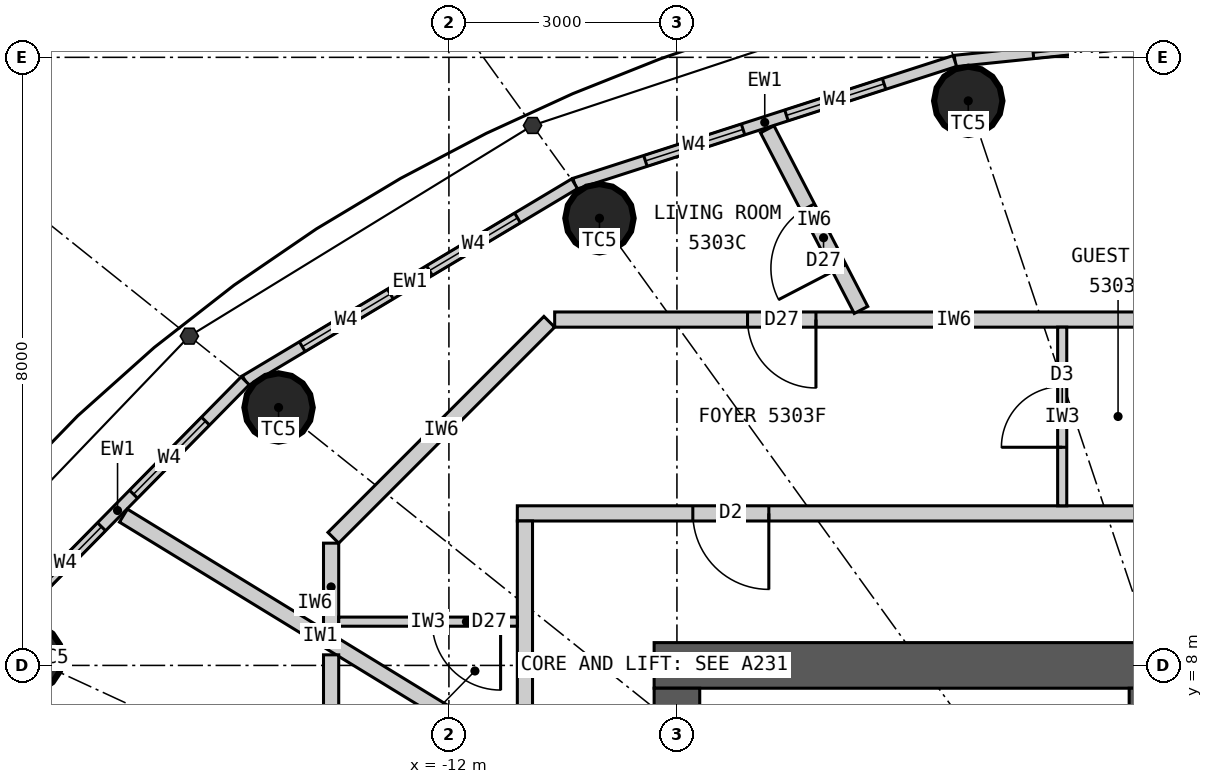
"""IFC4 building model, lengths in metres.
Left out: names, types, materials, properties, quantities, classifications, styles, units other than length and angle.
Written with IfcOpenShell. Run it as: python <this file> out.ifc"""

import sys

from ifc_helpers import new_model, si_unit, direction, frame, frame_2d, origin, origin_2d, place, context, subcontext, project, spatial, rectangle, circle, extrude, element, fill, save


model = new_model("IFC4")
c1 = context("Model", 3, precision=1e-05, world=origin(), true_north=direction((0.0, 1.0)))
c2 = subcontext(c1, "Body", "Model", "MODEL_VIEW")
j1 = project(units=[si_unit("LENGTHUNIT", "METRE"), si_unit("PLANEANGLEUNIT", "RADIAN")], contexts=[c1])
p1 = place(None, origin())
s1 = spatial("IfcSite", under=j1, at=p1, CompositionType="ELEMENT")
p2 = place(p1, origin())
s2 = spatial("IfcBuilding", under=s1, at=p2, CompositionType="ELEMENT")
p3 = place(p2, frame((0.0, 0.0, 199.5)))
s3 = spatial("IfcBuildingStorey", under=s2, at=p3, CompositionType="ELEMENT", Elevation=199.5)
for number, where, z_axis, x_axis in (
    (1, (-5.167, 15.427, 0.0), (0.0, 0.0, 1.0), (1.0, 0.0, 0.0)),
    (2, (-10.019, 13.883, 0.0), (0.0, 0.0, 1.0), (1.0, 0.0, 0.0)),
    (3, (-14.241, 11.393, 0.0), (0.0, 0.0, 1.0), (1.0, 0.0, 0.0)),
    (4, (-17.532, 8.098, 0.0), (0.0, 0.0, 1.0), (1.0, 0.0, 0.0)),
):
    element("IfcColumn", number, at=place(p3, frame(where, z_axis=z_axis, x_axis=x_axis)), inside=s3, PredefinedType="COLUMN", context=c2, shape_type="SweptSolid", body=[
        extrude(circle(Radius=0.45, at=origin_2d()), origin(), (0.0, 0.0, 1.0), 3.3),
    ])
p4 = place(p3, frame((-9.3, 8.0, 0.0), z_axis=(0.0, 0.0, 1.0), x_axis=(1.0, 0.0, 0.0)))
e5 = element("IfcWall", 5, at=p4, inside=s3, PredefinedType="SHEAR", context=c2, shape_type="SweptSolid", body=[
    extrude(rectangle(XDim=18.6, YDim=0.6, at=frame_2d((9.3, 0.0))), origin(), (0.0, 0.0, 1.0), 3.3),
])
p5 = place(p4, frame((8.0, 0.0, 0.0)))
e6 = element("IfcOpeningElement", 6, at=p5, cuts=e5, PredefinedType="OPENING", context=c2, shape_type="SweptSolid", body=[
    extrude(rectangle(XDim=1.2, YDim=2.2, at=frame_2d((0.6, 1.1))), frame((0.0, 0.31, 0.0), z_axis=(0.0, -1.0, 0.0), x_axis=(1.0, 0.0, 0.0)), (0.0, 0.0, 1.0), 0.62),
])
p6 = place(p4, frame((15.6, 0.0, 0.0)))
e7 = element("IfcOpeningElement", 7, at=p6, cuts=e5, PredefinedType="OPENING", context=c2, shape_type="SweptSolid", body=[
    extrude(rectangle(XDim=0.9, YDim=2.2, at=frame_2d((0.45, 1.1))), frame((0.0, 0.31, 0.0), z_axis=(0.0, -1.0, 0.0), x_axis=(1.0, 0.0, 0.0)), (0.0, 0.0, 1.0), 0.62),
])
p7 = place(p3, frame((-9.0, 7.7, 0.0), z_axis=(0.0, 0.0, 1.0), x_axis=(0.0, -1.0, 0.0)))
e8 = element("IfcWall", 8, at=p7, inside=s3, PredefinedType="SHEAR", context=c2, shape_type="SweptSolid", body=[
    extrude(rectangle(XDim=15.4, YDim=0.6, at=frame_2d((7.7, 0.0))), origin(), (0.0, 0.0, 1.0), 3.3),
])
p8 = place(p7, frame((6.8, 0.0, 0.0)))
e9 = element("IfcOpeningElement", 9, at=p8, cuts=e8, PredefinedType="OPENING", context=c2, shape_type="SweptSolid", body=[
    extrude(rectangle(XDim=1.8, YDim=2.2, at=frame_2d((0.9, 1.1))), frame((0.0, 0.31, 0.0), z_axis=(0.0, -1.0, 0.0), x_axis=(1.0, 0.0, 0.0)), (0.0, 0.0, 1.0), 0.62),
])
p9 = place(p3, frame((-2.75, 4.5, 0.0), z_axis=(0.0, 0.0, 1.0), x_axis=(0.0, 1.0, 0.0)))
e10 = element("IfcWall", 10, at=p9, inside=s3, PredefinedType="SHEAR", context=c2, shape_type="SweptSolid", body=[
    extrude(rectangle(XDim=3.2, YDim=0.6, at=frame_2d((1.6, 0.0))), origin(), (0.0, 0.0, 1.0), 3.3),
])
p10 = place(p9, frame((0.925, 0.0, 0.0)))
e11 = element("IfcOpeningElement", 11, at=p10, cuts=e10, PredefinedType="OPENING", context=c2, shape_type="SweptSolid", body=[
    extrude(rectangle(XDim=1.1, YDim=2.2, at=frame_2d((0.55, 1.1))), frame((0.0, 0.31, 0.0), z_axis=(0.0, -1.0, 0.0), x_axis=(1.0, 0.0, 0.0)), (0.0, 0.0, 1.0), 0.62),
])
p11 = place(p3, frame((0.0, 16.5, 0.0), z_axis=(0.0, 0.0, 1.0), x_axis=(-0.994774574972, -0.102095763818, 0.0)))
e12 = element("IfcWall", 12, at=p11, inside=s3, PredefinedType="ELEMENTEDWALL", context=c2, shape_type="SweptSolid", body=[
    extrude(rectangle(XDim=5.371, YDim=0.15, at=frame_2d((2.686, 0.0))), origin(), (0.0, 0.0, 1.0), 3.12),
])
p12 = place(p11, frame((1.035, 0.0, 0.9)))
e13 = element("IfcOpeningElement", 13, at=p12, cuts=e12, PredefinedType="OPENING", context=c2, shape_type="SweptSolid", body=[
    extrude(rectangle(XDim=1.35, YDim=1.9, at=frame_2d((0.675, 0.95))), frame((0.0, 0.085, 0.0), z_axis=(0.0, -1.0, 0.0), x_axis=(1.0, 0.0, 0.0)), (0.0, 0.0, 1.0), 0.17),
])
p13 = place(p11, frame((2.985, 0.0, 0.9)))
e14 = element("IfcOpeningElement", 14, at=p13, cuts=e12, PredefinedType="OPENING", context=c2, shape_type="SweptSolid", body=[
    extrude(rectangle(XDim=1.35, YDim=1.9, at=frame_2d((0.675, 0.95))), frame((0.0, 0.085, 0.0), z_axis=(0.0, -1.0, 0.0), x_axis=(1.0, 0.0, 0.0)), (0.0, 0.0, 1.0), 0.17),
])
p14 = place(p3, frame((-5.343, 15.952, 0.0), z_axis=(0.0, 0.0, 1.0), x_axis=(-0.951644702515, -0.307200846638, 0.0)))
e15 = element("IfcWall", 15, at=p14, inside=s3, PredefinedType="ELEMENTEDWALL", context=c2, shape_type="SweptSolid", body=[
    extrude(rectangle(XDim=5.258, YDim=0.15, at=frame_2d((2.629, 0.0))), origin(), (0.0, 0.0, 1.0), 3.12),
])
p15 = place(p14, frame((0.979, 0.0, 0.9)))
e16 = element("IfcOpeningElement", 16, at=p15, cuts=e15, PredefinedType="OPENING", context=c2, shape_type="SweptSolid", body=[
    extrude(rectangle(XDim=1.35, YDim=1.9, at=frame_2d((0.675, 0.95))), frame((0.0, 0.085, 0.0), z_axis=(0.0, -1.0, 0.0), x_axis=(1.0, 0.0, 0.0)), (0.0, 0.0, 1.0), 0.17),
])
p16 = place(p14, frame((2.929, 0.0, 0.9)))
e17 = element("IfcOpeningElement", 17, at=p16, cuts=e15, PredefinedType="OPENING", context=c2, shape_type="SweptSolid", body=[
    extrude(rectangle(XDim=1.35, YDim=1.9, at=frame_2d((0.675, 0.95))), frame((0.0, 0.085, 0.0), z_axis=(0.0, -1.0, 0.0), x_axis=(1.0, 0.0, 0.0)), (0.0, 0.0, 1.0), 0.17),
])
p17 = place(p3, frame((-10.346, 14.336, 0.0), z_axis=(0.0, 0.0, 1.0), x_axis=(-0.85822150553, -0.513279502265, 0.0)))
e18 = element("IfcWall", 18, at=p17, inside=s3, PredefinedType="ELEMENTEDWALL", context=c2, shape_type="SweptSolid", body=[
    extrude(rectangle(XDim=5.05, YDim=0.15, at=frame_2d((2.525, 0.0))), origin(), (0.0, 0.0, 1.0), 3.12),
])
p18 = place(p17, frame((0.875, 0.0, 0.9)))
e19 = element("IfcOpeningElement", 19, at=p18, cuts=e18, PredefinedType="OPENING", context=c2, shape_type="SweptSolid", body=[
    extrude(rectangle(XDim=1.35, YDim=1.9, at=frame_2d((0.675, 0.95))), frame((0.0, 0.085, 0.0), z_axis=(0.0, -1.0, 0.0), x_axis=(1.0, 0.0, 0.0)), (0.0, 0.0, 1.0), 0.17),
])
p19 = place(p17, frame((2.825, 0.0, 0.9)))
e20 = element("IfcOpeningElement", 20, at=p19, cuts=e18, PredefinedType="OPENING", context=c2, shape_type="SweptSolid", body=[
    extrude(rectangle(XDim=1.35, YDim=1.9, at=frame_2d((0.675, 0.95))), frame((0.0, 0.085, 0.0), z_axis=(0.0, -1.0, 0.0), x_axis=(1.0, 0.0, 0.0)), (0.0, 0.0, 1.0), 0.17),
])
p20 = place(p3, frame((-14.68, 11.744, 0.0), z_axis=(0.0, 0.0, 1.0), x_axis=(-0.701527379618, -0.712642501993, 0.0)))
e21 = element("IfcWall", 21, at=p20, inside=s3, PredefinedType="ELEMENTEDWALL", context=c2, shape_type="SweptSolid", body=[
    extrude(rectangle(XDim=4.788, YDim=0.15, at=frame_2d((2.394, 0.0))), origin(), (0.0, 0.0, 1.0), 3.12),
])
p21 = place(p20, frame((0.744, 0.0, 0.9)))
e22 = element("IfcOpeningElement", 22, at=p21, cuts=e21, PredefinedType="OPENING", context=c2, shape_type="SweptSolid", body=[
    extrude(rectangle(XDim=1.35, YDim=1.9, at=frame_2d((0.675, 0.95))), frame((0.0, 0.085, 0.0), z_axis=(0.0, -1.0, 0.0), x_axis=(1.0, 0.0, 0.0)), (0.0, 0.0, 1.0), 0.17),
])
p22 = place(p20, frame((2.694, 0.0, 0.9)))
e23 = element("IfcOpeningElement", 23, at=p22, cuts=e21, PredefinedType="OPENING", context=c2, shape_type="SweptSolid", body=[
    extrude(rectangle(XDim=1.35, YDim=1.9, at=frame_2d((0.675, 0.95))), frame((0.0, 0.085, 0.0), z_axis=(0.0, -1.0, 0.0), x_axis=(1.0, 0.0, 0.0)), (0.0, 0.0, 1.0), 0.17),
])
p23 = place(p3, frame((-11.1, 10.0, 0.0), z_axis=(0.0, 0.0, 1.0), x_axis=(1.0, 0.0, 0.0)))
e24 = element("IfcWall", 24, at=p23, inside=s3, PredefinedType="PARTITIONING", context=c2, shape_type="SweptSolid", body=[
    extrude(rectangle(XDim=22.2, YDim=0.2, at=frame_2d((11.1, 0.0))), origin(), (0.0, 0.0, 1.0), 3.12),
])
p24 = place(p23, frame((2.309, 0.0, 0.0)))
e25 = element("IfcOpeningElement", 25, at=p24, cuts=e24, PredefinedType="OPENING", context=c2, shape_type="SweptSolid", body=[
    extrude(rectangle(XDim=1.0, YDim=2.2, at=frame_2d((0.5, 1.1))), frame((0.0, 0.11, 0.0), z_axis=(0.0, -1.0, 0.0), x_axis=(1.0, 0.0, 0.0)), (0.0, 0.0, 1.0), 0.22),
])
p25 = place(p3, frame((-11.0, 9.9, 0.0), z_axis=(0.0, 0.0, 1.0), x_axis=(0.0, -1.0, 0.0)))
e26 = element("IfcWall", 26, at=p25, inside=s3, PredefinedType="PARTITIONING", context=c2, shape_type="SweptSolid", body=[
    extrude(rectangle(XDim=7.416, YDim=0.2, at=frame_2d((3.708, 0.0))), origin(), (0.0, 0.0, 1.0), 3.12),
])
p26 = place(p3, frame((-11.1, 6.797, 0.0), z_axis=(0.0, 0.0, 1.0), x_axis=(-0.852799818179, 0.522237943963, 0.0)))
e27 = element("IfcWall", 27, at=p26, inside=s3, PredefinedType="PARTITIONING", context=c2, shape_type="SweptSolid", body=[
    extrude(rectangle(XDim=6.077, YDim=0.2, at=frame_2d((3.039, 0.0))), origin(), (0.0, 0.0, 1.0), 3.12),
])
p27 = place(p3, frame((-0.101, 12.55, 0.0), z_axis=(0.0, 0.0, 1.0), x_axis=(-1.0, 0.0, 0.0)))
e28 = element("IfcWall", 28, at=p27, inside=s3, PredefinedType="PARTITIONING", context=c2, shape_type="SweptSolid", body=[
    extrude(rectangle(XDim=10.508, YDim=0.2, at=frame_2d((5.254, 0.0))), origin(), (0.0, 0.0, 1.0), 3.12),
])
p28 = place(p27, frame((1.4, 0.0, 0.0)))
e29 = element("IfcOpeningElement", 29, at=p28, cuts=e28, PredefinedType="OPENING", context=c2, shape_type="SweptSolid", body=[
    extrude(rectangle(XDim=0.8, YDim=2.1, at=frame_2d((0.4, 1.05))), frame((0.0, 0.11, 0.0), z_axis=(0.0, -1.0, 0.0), x_axis=(1.0, 0.0, 0.0)), (0.0, 0.0, 1.0), 0.22),
])
p29 = place(p27, frame((7.07, 0.0, 0.0)))
e30 = element("IfcOpeningElement", 30, at=p29, cuts=e28, PredefinedType="OPENING", context=c2, shape_type="SweptSolid", body=[
    extrude(rectangle(XDim=0.9, YDim=2.1, at=frame_2d((0.45, 1.05))), frame((0.0, 0.11, 0.0), z_axis=(0.0, -1.0, 0.0), x_axis=(1.0, 0.0, 0.0)), (0.0, 0.0, 1.0), 0.22),
])
p30 = place(p3, frame((-10.679, 12.521, 0.0), z_axis=(0.0, 0.0, 1.0), x_axis=(-0.707106781187, -0.707106781187, 0.0)))
e31 = element("IfcWall", 31, at=p30, inside=s3, PredefinedType="PARTITIONING", context=c2, shape_type="SweptSolid", body=[
    extrude(rectangle(XDim=4.019, YDim=0.2, at=frame_2d((2.009, 0.0))), origin(), (0.0, 0.0, 1.0), 3.12),
])
p31 = place(p3, frame((-13.55, 9.609, 0.0), z_axis=(0.0, 0.0, 1.0), x_axis=(0.0, -1.0, 0.0)))
e32 = element("IfcWall", 32, at=p31, inside=s3, PredefinedType="PARTITIONING", context=c2, shape_type="SweptSolid", body=[
    extrude(rectangle(XDim=1.153, YDim=0.2, at=frame_2d((0.576, 0.0))), origin(), (0.0, 0.0, 1.0), 3.12),
])
p32 = place(p3, frame((-6.578, 12.677, 0.0), z_axis=(0.0, 0.0, 1.0), x_axis=(-0.460620531465, 0.887597164255, 0.0)))
e33 = element("IfcWall", 33, at=p32, inside=s3, PredefinedType="PARTITIONING", context=c2, shape_type="SweptSolid", body=[
    extrude(rectangle(XDim=2.678, YDim=0.2, at=frame_2d((1.339, 0.0))), origin(), (0.0, 0.0, 1.0), 3.12),
])
p33 = place(p32, frame((0.62, 0.0, 0.0)))
e34 = element("IfcOpeningElement", 34, at=p33, cuts=e33, PredefinedType="OPENING", context=c2, shape_type="SweptSolid", body=[
    extrude(rectangle(XDim=0.9, YDim=2.1, at=frame_2d((0.45, 1.05))), frame((0.0, 0.11, 0.0), z_axis=(0.0, -1.0, 0.0), x_axis=(1.0, 0.0, 0.0)), (0.0, 0.0, 1.0), 0.22),
])
p34 = place(p3, frame((-3.931, 10.1, 0.0), z_axis=(0.0, 0.0, 1.0), x_axis=(0.0, 1.0, 0.0)))
e35 = element("IfcWall", 35, at=p34, inside=s3, PredefinedType="PARTITIONING", context=c2, shape_type="SweptSolid", body=[
    extrude(rectangle(XDim=2.35, YDim=0.12, at=frame_2d((1.175, 0.0))), origin(), (0.0, 0.0, 1.0), 3.12),
])
p35 = place(p34, frame((0.77, 0.0, 0.0)))
e36 = element("IfcOpeningElement", 36, at=p35, cuts=e35, PredefinedType="OPENING", context=c2, shape_type="SweptSolid", body=[
    extrude(rectangle(XDim=0.8, YDim=2.1, at=frame_2d((0.4, 1.05))), frame((0.0, 0.07, 0.0), z_axis=(0.0, -1.0, 0.0), x_axis=(1.0, 0.0, 0.0)), (0.0, 0.0, 1.0), 0.14),
])
p36 = place(p3, frame((-11.1, 8.576, 0.0), z_axis=(0.0, 0.0, 1.0), x_axis=(-1.0, 0.0, 0.0)))
e37 = element("IfcWall", 37, at=p36, inside=s3, PredefinedType="PARTITIONING", context=c2, shape_type="SweptSolid", body=[
    extrude(rectangle(XDim=2.35, YDim=0.12, at=frame_2d((1.175, 0.0))), origin(), (0.0, 0.0, 1.0), 3.12),
])
p37 = place(p36, frame((0.22, 0.0, 0.0)))
e38 = element("IfcOpeningElement", 38, at=p37, cuts=e37, PredefinedType="OPENING", context=c2, shape_type="SweptSolid", body=[
    extrude(rectangle(XDim=0.9, YDim=2.1, at=frame_2d((0.45, 1.05))), frame((0.0, 0.07, 0.0), z_axis=(0.0, -1.0, 0.0), x_axis=(1.0, 0.0, 0.0)), (0.0, 0.0, 1.0), 0.14),
])
p38 = place(p3, frame((-13.55, 8.139, 0.0), z_axis=(0.0, 0.0, 1.0), x_axis=(0.0, -1.0, 0.0)))
e39 = element("IfcWall", 39, at=p38, inside=s3, PredefinedType="PARTITIONING", context=c2, shape_type="SweptSolid", body=[
    extrude(rectangle(XDim=12.496, YDim=0.2, at=frame_2d((6.248, 0.0))), origin(), (0.0, 0.0, 1.0), 3.12),
])
p39 = place(p38, frame((2.42, 0.0, 0.0)))
e40 = element("IfcOpeningElement", 40, at=p39, cuts=e39, PredefinedType="OPENING", context=c2, shape_type="SweptSolid", body=[
    extrude(rectangle(XDim=0.8, YDim=2.1, at=frame_2d((0.4, 1.05))), frame((0.0, 0.11, 0.0), z_axis=(0.0, -1.0, 0.0), x_axis=(1.0, 0.0, 0.0)), (0.0, 0.0, 1.0), 0.22),
])
p40 = place(p38, frame((9.776, 0.0, 0.0)))
e41 = element("IfcOpeningElement", 41, at=p40, cuts=e39, PredefinedType="OPENING", context=c2, shape_type="SweptSolid", body=[
    extrude(rectangle(XDim=0.8, YDim=2.1, at=frame_2d((0.4, 1.05))), frame((0.0, 0.11, 0.0), z_axis=(0.0, -1.0, 0.0), x_axis=(1.0, 0.0, 0.0)), (0.0, 0.0, 1.0), 0.22),
])
p41 = place(p38, frame((5.82, 0.0, 0.0)))
e42 = element("IfcOpeningElement", 42, at=p41, cuts=e39, PredefinedType="OPENING", context=c2, shape_type="SweptSolid", body=[
    extrude(rectangle(XDim=0.9, YDim=2.1, at=frame_2d((0.45, 1.05))), frame((0.0, 0.11, 0.0), z_axis=(0.0, -1.0, 0.0), x_axis=(1.0, 0.0, 0.0)), (0.0, 0.0, 1.0), 0.22),
])
p42 = place(p13, origin())
e43 = element("IfcWindow", 43, at=p42, inside=s3, PartitioningType="SINGLE_PANEL", PredefinedType="WINDOW", context=c2, shape_type="SweptSolid", body=[
    extrude(rectangle(XDim=1.35, YDim=1.9, at=frame_2d((0.675, 0.95))), frame((0.0, 0.03, 0.0), z_axis=(0.0, -1.0, 0.0), x_axis=(1.0, 0.0, 0.0)), (0.0, 0.0, 1.0), 0.06),
])
fill(e14, e43)
p43 = place(p15, origin())
e44 = element("IfcWindow", 44, at=p43, inside=s3, PartitioningType="SINGLE_PANEL", PredefinedType="WINDOW", context=c2, shape_type="SweptSolid", body=[
    extrude(rectangle(XDim=1.35, YDim=1.9, at=frame_2d((0.675, 0.95))), frame((0.0, 0.03, 0.0), z_axis=(0.0, -1.0, 0.0), x_axis=(1.0, 0.0, 0.0)), (0.0, 0.0, 1.0), 0.06),
])
fill(e16, e44)
p44 = place(p16, origin())
e45 = element("IfcWindow", 45, at=p44, inside=s3, PartitioningType="SINGLE_PANEL", PredefinedType="WINDOW", context=c2, shape_type="SweptSolid", body=[
    extrude(rectangle(XDim=1.35, YDim=1.9, at=frame_2d((0.675, 0.95))), frame((0.0, 0.03, 0.0), z_axis=(0.0, -1.0, 0.0), x_axis=(1.0, 0.0, 0.0)), (0.0, 0.0, 1.0), 0.06),
])
fill(e17, e45)
p45 = place(p18, origin())
e46 = element("IfcWindow", 46, at=p45, inside=s3, PartitioningType="SINGLE_PANEL", PredefinedType="WINDOW", context=c2, shape_type="SweptSolid", body=[
    extrude(rectangle(XDim=1.35, YDim=1.9, at=frame_2d((0.675, 0.95))), frame((0.0, 0.03, 0.0), z_axis=(0.0, -1.0, 0.0), x_axis=(1.0, 0.0, 0.0)), (0.0, 0.0, 1.0), 0.06),
])
fill(e19, e46)
p46 = place(p19, origin())
e47 = element("IfcWindow", 47, at=p46, inside=s3, PartitioningType="SINGLE_PANEL", PredefinedType="WINDOW", context=c2, shape_type="SweptSolid", body=[
    extrude(rectangle(XDim=1.35, YDim=1.9, at=frame_2d((0.675, 0.95))), frame((0.0, 0.03, 0.0), z_axis=(0.0, -1.0, 0.0), x_axis=(1.0, 0.0, 0.0)), (0.0, 0.0, 1.0), 0.06),
])
fill(e20, e47)
p47 = place(p21, origin())
e48 = element("IfcWindow", 48, at=p47, inside=s3, PartitioningType="SINGLE_PANEL", PredefinedType="WINDOW", context=c2, shape_type="SweptSolid", body=[
    extrude(rectangle(XDim=1.35, YDim=1.9, at=frame_2d((0.675, 0.95))), frame((0.0, 0.03, 0.0), z_axis=(0.0, -1.0, 0.0), x_axis=(1.0, 0.0, 0.0)), (0.0, 0.0, 1.0), 0.06),
])
fill(e22, e48)
p48 = place(p22, origin())
e49 = element("IfcWindow", 49, at=p48, inside=s3, PartitioningType="SINGLE_PANEL", PredefinedType="WINDOW", context=c2, shape_type="SweptSolid", body=[
    extrude(rectangle(XDim=1.35, YDim=1.9, at=frame_2d((0.675, 0.95))), frame((0.0, 0.03, 0.0), z_axis=(0.0, -1.0, 0.0), x_axis=(1.0, 0.0, 0.0)), (0.0, 0.0, 1.0), 0.06),
])
fill(e23, e49)
p49 = place(p24, origin())
e50 = element("IfcDoor", 50, at=p49, inside=s3, OperationType="SINGLE_SWING_RIGHT", PredefinedType="DOOR", context=c2, shape_type="SweptSolid", body=[
    extrude(rectangle(XDim=1.0, YDim=2.2, at=frame_2d((0.5, 1.1))), frame((0.0, 0.025, 0.0), z_axis=(0.0, -1.0, 0.0), x_axis=(1.0, 0.0, 0.0)), (0.0, 0.0, 1.0), 0.05),
])
fill(e25, e50)
p50 = place(p35, origin())
e51 = element("IfcDoor", 51, at=p50, inside=s3, OperationType="SINGLE_SWING_LEFT", PredefinedType="DOOR", context=c2, shape_type="SweptSolid", body=[
    extrude(rectangle(XDim=0.8, YDim=2.1, at=frame_2d((0.4, 1.05))), frame((0.0, 0.025, 0.0), z_axis=(0.0, -1.0, 0.0), x_axis=(1.0, 0.0, 0.0)), (0.0, 0.0, 1.0), 0.05),
])
fill(e36, e51)
p51 = place(p37, origin())
e52 = element("IfcDoor", 52, at=p51, inside=s3, OperationType="SINGLE_SWING_LEFT", PredefinedType="DOOR", context=c2, shape_type="SweptSolid", body=[
    extrude(rectangle(XDim=0.9, YDim=2.1, at=frame_2d((0.45, 1.05))), frame((0.0, 0.025, 0.0), z_axis=(0.0, -1.0, 0.0), x_axis=(1.0, 0.0, 0.0)), (0.0, 0.0, 1.0), 0.05),
])
fill(e38, e52)
p52 = place(p29, origin())
e53 = element("IfcDoor", 53, at=p52, inside=s3, OperationType="SINGLE_SWING_LEFT", PredefinedType="DOOR", context=c2, shape_type="SweptSolid", body=[
    extrude(rectangle(XDim=0.9, YDim=2.1, at=frame_2d((0.45, 1.05))), frame((0.0, 0.025, 0.0), z_axis=(0.0, -1.0, 0.0), x_axis=(1.0, 0.0, 0.0)), (0.0, 0.0, 1.0), 0.05),
])
fill(e30, e53)
p53 = place(p33, origin())
e54 = element("IfcDoor", 54, at=p53, inside=s3, OperationType="SINGLE_SWING_LEFT", PredefinedType="DOOR", context=c2, shape_type="SweptSolid", body=[
    extrude(rectangle(XDim=0.9, YDim=2.1, at=frame_2d((0.45, 1.05))), frame((0.0, 0.025, 0.0), z_axis=(0.0, -1.0, 0.0), x_axis=(1.0, 0.0, 0.0)), (0.0, 0.0, 1.0), 0.05),
])
fill(e34, e54)
save(model, sys.argv[1])
